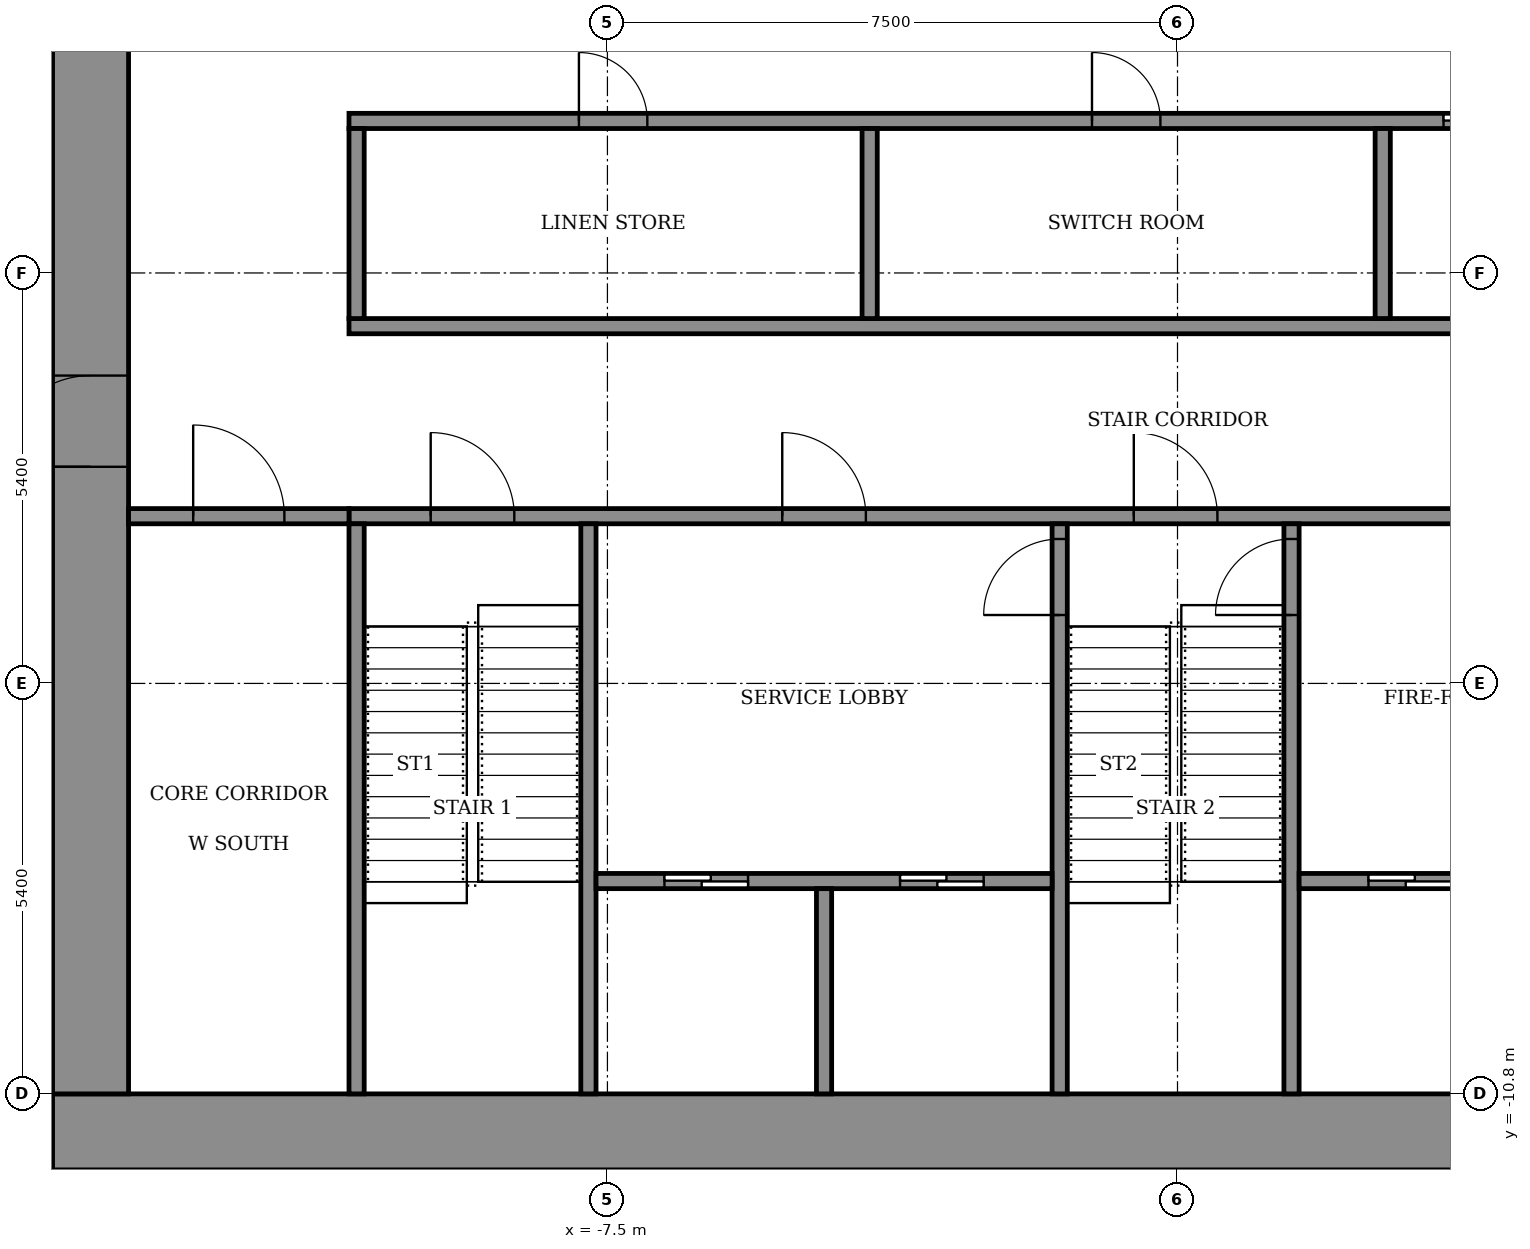
"""IFC4 building model, lengths in metres.
Left out: names, types, materials, properties, quantities, classifications, styles, units other than length and angle.
Written with IfcOpenShell. Run it as: python <this file> out.ifc"""

import sys

from ifc_helpers import new_model, si_unit, direction, frame, frame_2d, origin, place, context, subcontext, project, spatial, rectangle, extrude, element, fill, save


model = new_model("IFC4")
c1 = context("Model", 3, precision=1e-05, world=origin(), true_north=direction((0.0, 1.0)))
c2 = subcontext(c1, "Body", "Model", "MODEL_VIEW")
j1 = project(units=[si_unit("LENGTHUNIT", "METRE"), si_unit("PLANEANGLEUNIT", "RADIAN")], contexts=[c1])
p1 = place(None, origin())
s1 = spatial("IfcSite", under=j1, at=p1, CompositionType="ELEMENT")
p2 = place(p1, origin())
s2 = spatial("IfcBuilding", under=s1, at=p2, CompositionType="ELEMENT")
p3 = place(p2, frame((0.0, 0.0, 125.5)))
s3 = spatial("IfcBuildingStorey", under=s2, at=p3, CompositionType="ELEMENT", Elevation=125.5)
p4 = place(p3, frame((-14.8, -11.3, 0.0), z_axis=(0.0, 0.0, 1.0), x_axis=(1.0, 0.0, 0.0)))
e1 = element("IfcWall", 1, at=p4, inside=s3, PredefinedType="SHEAR", context=c2, shape_type="SweptSolid", body=[
    extrude(rectangle(XDim=29.6, YDim=1.0, at=frame_2d((14.8, 0.0))), origin(), (0.0, 0.0, 1.0), 4.6),
])
p5 = place(p3, frame((-14.3, -10.8, 0.0), z_axis=(0.0, 0.0, 1.0), x_axis=(0.0, 1.0, 0.0)))
e2 = element("IfcWall", 2, at=p5, inside=s3, PredefinedType="SHEAR", context=c2, shape_type="SweptSolid", body=[
    extrude(rectangle(XDim=21.6, YDim=1.0, at=frame_2d((10.8, 0.0))), origin(), (0.0, 0.0, 1.0), 4.6),
])
p6 = place(p5, frame((8.25, 0.0, 0.0)))
e3 = element("IfcOpeningElement", 3, at=p6, cuts=e2, PredefinedType="OPENING", context=c2, shape_type="SweptSolid", body=[
    extrude(rectangle(XDim=1.2, YDim=2.1, at=frame_2d((0.6, 1.05))), frame((0.0, 0.51, 0.0), z_axis=(0.0, -1.0, 0.0), x_axis=(1.0, 0.0, 0.0)), (0.0, 0.0, 1.0), 1.02),
])
p7 = place(p5, frame((15.25, 0.0, 0.0)))
e4 = element("IfcOpeningElement", 4, at=p7, cuts=e2, PredefinedType="OPENING", context=c2, shape_type="SweptSolid", body=[
    extrude(rectangle(XDim=1.2, YDim=2.1, at=frame_2d((0.6, 1.05))), frame((0.0, 0.51, 0.0), z_axis=(0.0, -1.0, 0.0), x_axis=(1.0, 0.0, 0.0)), (0.0, 0.0, 1.0), 1.02),
])
p8 = place(p3, frame((-10.9, -3.2, 0.0), z_axis=(0.0, 0.0, 1.0), x_axis=(1.0, 0.0, 0.0)))
e5 = element("IfcWall", 5, at=p8, inside=s3, PredefinedType="SHEAR", context=c2, shape_type="SweptSolid", body=[
    extrude(rectangle(XDim=21.8, YDim=0.2, at=frame_2d((10.9, 0.0))), origin(), (0.0, 0.0, 1.0), 4.05),
])
p9 = place(p8, frame((1.075, 0.0, 0.0)))
e6 = element("IfcOpeningElement", 6, at=p9, cuts=e5, PredefinedType="OPENING", context=c2, shape_type="SweptSolid", body=[
    extrude(rectangle(XDim=1.1, YDim=2.1, at=frame_2d((0.55, 1.05))), frame((0.0, 0.11, 0.0), z_axis=(0.0, -1.0, 0.0), x_axis=(1.0, 0.0, 0.0)), (0.0, 0.0, 1.0), 0.22),
])
p10 = place(p8, frame((10.325, 0.0, 0.0)))
e7 = element("IfcOpeningElement", 7, at=p10, cuts=e5, PredefinedType="OPENING", context=c2, shape_type="SweptSolid", body=[
    extrude(rectangle(XDim=1.1, YDim=2.1, at=frame_2d((0.55, 1.05))), frame((0.0, 0.11, 0.0), z_axis=(0.0, -1.0, 0.0), x_axis=(1.0, 0.0, 0.0)), (0.0, 0.0, 1.0), 0.22),
])
p11 = place(p8, frame((19.625, 0.0, 0.0)))
e8 = element("IfcOpeningElement", 8, at=p11, cuts=e5, PredefinedType="OPENING", context=c2, shape_type="SweptSolid", body=[
    extrude(rectangle(XDim=1.1, YDim=2.1, at=frame_2d((0.55, 1.05))), frame((0.0, 0.11, 0.0), z_axis=(0.0, -1.0, 0.0), x_axis=(1.0, 0.0, 0.0)), (0.0, 0.0, 1.0), 0.22),
])
p12 = place(p8, frame((5.7, 0.0, 0.0)))
e9 = element("IfcOpeningElement", 9, at=p12, cuts=e5, PredefinedType="OPENING", context=c2, shape_type="SweptSolid", body=[
    extrude(rectangle(XDim=1.1, YDim=2.1, at=frame_2d((0.55, 1.05))), frame((0.0, 0.11, 0.0), z_axis=(0.0, -1.0, 0.0), x_axis=(1.0, 0.0, 0.0)), (0.0, 0.0, 1.0), 0.22),
])
p13 = place(p8, frame((14.975, 0.0, 0.0)))
e10 = element("IfcOpeningElement", 10, at=p13, cuts=e5, PredefinedType="OPENING", context=c2, shape_type="SweptSolid", body=[
    extrude(rectangle(XDim=1.1, YDim=2.1, at=frame_2d((0.55, 1.05))), frame((0.0, 0.11, 0.0), z_axis=(0.0, -1.0, 0.0), x_axis=(1.0, 0.0, 0.0)), (0.0, 0.0, 1.0), 0.22),
])
p14 = place(p3, frame((-10.9, -0.7, 0.0), z_axis=(0.0, 0.0, 1.0), x_axis=(1.0, 0.0, 0.0)))
e11 = element("IfcWall", 11, at=p14, inside=s3, PredefinedType="SHEAR", context=c2, shape_type="SweptSolid", body=[
    extrude(rectangle(XDim=21.8, YDim=0.2, at=frame_2d((10.9, 0.0))), origin(), (0.0, 0.0, 1.0), 4.05),
])
p15 = place(p3, frame((-10.9, 2.0, 0.0), z_axis=(0.0, 0.0, 1.0), x_axis=(1.0, 0.0, 0.0)))
e12 = element("IfcWall", 12, at=p15, inside=s3, PredefinedType="SHEAR", context=c2, shape_type="SweptSolid", body=[
    extrude(rectangle(XDim=21.8, YDim=0.2, at=frame_2d((10.9, 0.0))), origin(), (0.0, 0.0, 1.0), 4.05),
])
p16 = place(p15, frame((14.4, 0.0, 0.0)))
e13 = element("IfcOpeningElement", 13, at=p16, cuts=e12, PredefinedType="OPENING", context=c2, shape_type="SweptSolid", body=[
    extrude(rectangle(XDim=1.1, YDim=2.1, at=frame_2d((0.55, 1.05))), frame((0.0, 0.11, 0.0), z_axis=(0.0, -1.0, 0.0), x_axis=(1.0, 0.0, 0.0)), (0.0, 0.0, 1.0), 0.22),
])
p17 = place(p15, frame((17.1, 0.0, 0.0)))
e14 = element("IfcOpeningElement", 14, at=p17, cuts=e12, PredefinedType="OPENING", context=c2, shape_type="SweptSolid", body=[
    extrude(rectangle(XDim=1.1, YDim=2.1, at=frame_2d((0.55, 1.05))), frame((0.0, 0.11, 0.0), z_axis=(0.0, -1.0, 0.0), x_axis=(1.0, 0.0, 0.0)), (0.0, 0.0, 1.0), 0.22),
])
p18 = place(p15, frame((19.8, 0.0, 0.0)))
e15 = element("IfcOpeningElement", 15, at=p18, cuts=e12, PredefinedType="OPENING", context=c2, shape_type="SweptSolid", body=[
    extrude(rectangle(XDim=1.1, YDim=2.1, at=frame_2d((0.55, 1.05))), frame((0.0, 0.11, 0.0), z_axis=(0.0, -1.0, 0.0), x_axis=(1.0, 0.0, 0.0)), (0.0, 0.0, 1.0), 0.22),
])
p19 = place(p15, frame((3.025, 0.0, 0.0)))
e16 = element("IfcOpeningElement", 16, at=p19, cuts=e12, PredefinedType="OPENING", context=c2, shape_type="SweptSolid", body=[
    extrude(rectangle(XDim=0.9, YDim=2.1, at=frame_2d((0.45, 1.05))), frame((0.0, 0.11, 0.0), z_axis=(0.0, -1.0, 0.0), x_axis=(1.0, 0.0, 0.0)), (0.0, 0.0, 1.0), 0.22),
])
p20 = place(p15, frame((9.775, 0.0, 0.0)))
e17 = element("IfcOpeningElement", 17, at=p20, cuts=e12, PredefinedType="OPENING", context=c2, shape_type="SweptSolid", body=[
    extrude(rectangle(XDim=0.9, YDim=2.1, at=frame_2d((0.45, 1.05))), frame((0.0, 0.11, 0.0), z_axis=(0.0, -1.0, 0.0), x_axis=(1.0, 0.0, 0.0)), (0.0, 0.0, 1.0), 0.22),
])
for number, where, z_axis, x_axis in (
    (18, (-10.8, -10.8, 0.0), (0.0, 0.0, 1.0), (0.0, 1.0, 0.0)),
    (19, (-7.75, -10.8, 0.0), (0.0, 0.0, 1.0), (0.0, 1.0, 0.0)),
):
    element("IfcWall", number, at=place(p3, frame(where, z_axis=z_axis, x_axis=x_axis)), inside=s3, PredefinedType="SHEAR", context=c2, shape_type="SweptSolid", body=[
        extrude(rectangle(XDim=7.5, YDim=0.2, at=frame_2d((3.75, 0.0))), origin(), (0.0, 0.0, 1.0), 4.05),
    ])
p21 = place(p3, frame((-1.55, -10.8, 0.0), z_axis=(0.0, 0.0, 1.0), x_axis=(0.0, 1.0, 0.0)))
e20 = element("IfcWall", 20, at=p21, inside=s3, PredefinedType="SHEAR", context=c2, shape_type="SweptSolid", body=[
    extrude(rectangle(XDim=7.5, YDim=0.2, at=frame_2d((3.75, 0.0))), origin(), (0.0, 0.0, 1.0), 4.05),
])
p22 = place(p21, frame((6.3, 0.0, 0.0)))
e21 = element("IfcOpeningElement", 21, at=p22, cuts=e20, PredefinedType="OPENING", context=c2, shape_type="SweptSolid", body=[
    extrude(rectangle(XDim=1.0, YDim=2.1, at=frame_2d((0.5, 1.05))), frame((0.0, 0.11, 0.0), z_axis=(0.0, -1.0, 0.0), x_axis=(1.0, 0.0, 0.0)), (0.0, 0.0, 1.0), 0.22),
])
p23 = place(p3, frame((1.5, -10.8, 0.0), z_axis=(0.0, 0.0, 1.0), x_axis=(0.0, 1.0, 0.0)))
e22 = element("IfcWall", 22, at=p23, inside=s3, PredefinedType="SHEAR", context=c2, shape_type="SweptSolid", body=[
    extrude(rectangle(XDim=7.5, YDim=0.2, at=frame_2d((3.75, 0.0))), origin(), (0.0, 0.0, 1.0), 4.05),
])
p24 = place(p23, frame((6.3, 0.0, 0.0)))
e23 = element("IfcOpeningElement", 23, at=p24, cuts=e22, PredefinedType="OPENING", context=c2, shape_type="SweptSolid", body=[
    extrude(rectangle(XDim=1.0, YDim=2.1, at=frame_2d((0.5, 1.05))), frame((0.0, 0.11, 0.0), z_axis=(0.0, -1.0, 0.0), x_axis=(1.0, 0.0, 0.0)), (0.0, 0.0, 1.0), 0.22),
])
p25 = place(p3, frame((-7.65, -8.0, 0.0), z_axis=(0.0, 0.0, 1.0), x_axis=(1.0, 0.0, 0.0)))
e24 = element("IfcWall", 24, at=p25, inside=s3, PredefinedType="SHEAR", context=c2, shape_type="SweptSolid", body=[
    extrude(rectangle(XDim=6.0, YDim=0.2, at=frame_2d((3.0, 0.0))), origin(), (0.0, 0.0, 1.0), 4.05),
])
p26 = place(p25, frame((0.9, 0.0, 0.0)))
e25 = element("IfcOpeningElement", 25, at=p26, cuts=e24, PredefinedType="OPENING", context=c2, shape_type="SweptSolid", body=[
    extrude(rectangle(XDim=1.1, YDim=2.1, at=frame_2d((0.55, 1.05))), frame((0.0, 0.11, 0.0), z_axis=(0.0, -1.0, 0.0), x_axis=(1.0, 0.0, 0.0)), (0.0, 0.0, 1.0), 0.22),
])
p27 = place(p25, frame((4.0, 0.0, 0.0)))
e26 = element("IfcOpeningElement", 26, at=p27, cuts=e24, PredefinedType="OPENING", context=c2, shape_type="SweptSolid", body=[
    extrude(rectangle(XDim=1.1, YDim=2.1, at=frame_2d((0.55, 1.05))), frame((0.0, 0.11, 0.0), z_axis=(0.0, -1.0, 0.0), x_axis=(1.0, 0.0, 0.0)), (0.0, 0.0, 1.0), 0.22),
])
p28 = place(p3, frame((-4.65, -10.8, 0.0), z_axis=(0.0, 0.0, 1.0), x_axis=(0.0, 1.0, 0.0)))
e27 = element("IfcWall", 27, at=p28, inside=s3, PredefinedType="SHEAR", context=c2, shape_type="SweptSolid", body=[
    extrude(rectangle(XDim=2.7, YDim=0.2, at=frame_2d((1.35, 0.0))), origin(), (0.0, 0.0, 1.0), 4.05),
])
p29 = place(p3, frame((1.6, -8.0, 0.0), z_axis=(0.0, 0.0, 1.0), x_axis=(1.0, 0.0, 0.0)))
e28 = element("IfcWall", 28, at=p29, inside=s3, PredefinedType="SHEAR", context=c2, shape_type="SweptSolid", body=[
    extrude(rectangle(XDim=6.05, YDim=0.2, at=frame_2d((3.025, 0.0))), origin(), (0.0, 0.0, 1.0), 4.05),
])
p30 = place(p29, frame((0.913, 0.0, 0.0)))
e29 = element("IfcOpeningElement", 29, at=p30, cuts=e28, PredefinedType="OPENING", context=c2, shape_type="SweptSolid", body=[
    extrude(rectangle(XDim=1.1, YDim=2.1, at=frame_2d((0.55, 1.05))), frame((0.0, 0.11, 0.0), z_axis=(0.0, -1.0, 0.0), x_axis=(1.0, 0.0, 0.0)), (0.0, 0.0, 1.0), 0.22),
])
p31 = place(p29, frame((4.038, 0.0, 0.0)))
e30 = element("IfcOpeningElement", 30, at=p31, cuts=e28, PredefinedType="OPENING", context=c2, shape_type="SweptSolid", body=[
    extrude(rectangle(XDim=1.1, YDim=2.1, at=frame_2d((0.55, 1.05))), frame((0.0, 0.11, 0.0), z_axis=(0.0, -1.0, 0.0), x_axis=(1.0, 0.0, 0.0)), (0.0, 0.0, 1.0), 0.22),
])
for number, where, z_axis, x_axis in (
    (31, (-10.8, -0.6, 0.0), (0.0, 0.0, 1.0), (0.0, 1.0, 0.0)),
    (32, (-4.05, -0.6, 0.0), (0.0, 0.0, 1.0), (0.0, 1.0, 0.0)),
):
    element("IfcWall", number, at=place(p3, frame(where, z_axis=z_axis, x_axis=x_axis)), inside=s3, PredefinedType="STANDARD", context=c2, shape_type="SweptSolid", body=[
        extrude(rectangle(XDim=2.5, YDim=0.2, at=frame_2d((1.25, 0.0))), origin(), (0.0, 0.0, 1.0), 4.05),
    ])
p32 = place(p3, frame((2.7, -0.6, 0.0), z_axis=(0.0, 0.0, 1.0), x_axis=(0.0, 1.0, 0.0)))
e33 = element("IfcWall", 33, at=p32, inside=s3, PredefinedType="SHEAR", context=c2, shape_type="SweptSolid", body=[
    extrude(rectangle(XDim=2.5, YDim=0.2, at=frame_2d((1.25, 0.0))), origin(), (0.0, 0.0, 1.0), 4.05),
])
p33 = place(p3, frame((-13.8, -3.2, 0.0), z_axis=(0.0, 0.0, 1.0), x_axis=(1.0, 0.0, 0.0)))
e34 = element("IfcWall", 34, at=p33, inside=s3, PredefinedType="STANDARD", context=c2, shape_type="SweptSolid", body=[
    extrude(rectangle(XDim=2.9, YDim=0.2, at=frame_2d((1.45, 0.0))), origin(), (0.0, 0.0, 1.0), 4.05),
])
p34 = place(p33, frame((0.85, 0.0, 0.0)))
e35 = element("IfcOpeningElement", 35, at=p34, cuts=e34, PredefinedType="OPENING", context=c2, shape_type="SweptSolid", body=[
    extrude(rectangle(XDim=1.2, YDim=2.1, at=frame_2d((0.6, 1.05))), frame((0.0, 0.11, 0.0), z_axis=(0.0, -1.0, 0.0), x_axis=(1.0, 0.0, 0.0)), (0.0, 0.0, 1.0), 0.22),
])
p35 = place(p6, origin())
e36 = element("IfcDoor", 36, at=p35, inside=s3, OperationType="DOUBLE_DOOR_SINGLE_SWING", PredefinedType="DOOR", context=c2, shape_type="SweptSolid", body=[
    extrude(rectangle(XDim=1.2, YDim=2.1, at=frame_2d((0.6, 1.05))), frame((0.0, 0.025, 0.0), z_axis=(0.0, -1.0, 0.0), x_axis=(1.0, 0.0, 0.0)), (0.0, 0.0, 1.0), 0.05),
])
fill(e3, e36)
p36 = place(p16, origin())
e37 = element("IfcDoor", 37, at=p36, inside=s3, OperationType="SLIDING_TO_LEFT", PredefinedType="DOOR", context=c2, shape_type="SweptSolid", body=[
    extrude(rectangle(XDim=1.1, YDim=2.1, at=frame_2d((0.55, 1.05))), frame((0.0, 0.025, 0.0), z_axis=(0.0, -1.0, 0.0), x_axis=(1.0, 0.0, 0.0)), (0.0, 0.0, 1.0), 0.05),
])
fill(e13, e37)
p37 = place(p19, origin())
e38 = element("IfcDoor", 38, at=p37, inside=s3, OperationType="SINGLE_SWING_RIGHT", PredefinedType="DOOR", context=c2, shape_type="SweptSolid", body=[
    extrude(rectangle(XDim=0.9, YDim=2.1, at=frame_2d((0.45, 1.05))), frame((0.0, 0.025, 0.0), z_axis=(0.0, -1.0, 0.0), x_axis=(1.0, 0.0, 0.0)), (0.0, 0.0, 1.0), 0.05),
])
fill(e16, e38)
p38 = place(p20, origin())
e39 = element("IfcDoor", 39, at=p38, inside=s3, OperationType="SINGLE_SWING_LEFT", PredefinedType="DOOR", context=c2, shape_type="SweptSolid", body=[
    extrude(rectangle(XDim=0.9, YDim=2.1, at=frame_2d((0.45, 1.05))), frame((0.0, 0.025, 0.0), z_axis=(0.0, -1.0, 0.0), x_axis=(1.0, 0.0, 0.0)), (0.0, 0.0, 1.0), 0.05),
])
fill(e17, e39)
p39 = place(p30, origin())
e40 = element("IfcDoor", 40, at=p39, inside=s3, OperationType="SLIDING_TO_LEFT", PredefinedType="DOOR", context=c2, shape_type="SweptSolid", body=[
    extrude(rectangle(XDim=1.1, YDim=2.1, at=frame_2d((0.55, 1.05))), frame((0.0, 0.025, 0.0), z_axis=(0.0, -1.0, 0.0), x_axis=(1.0, 0.0, 0.0)), (0.0, 0.0, 1.0), 0.05),
])
fill(e29, e40)
p40 = place(p26, origin())
e41 = element("IfcDoor", 41, at=p40, inside=s3, OperationType="SLIDING_TO_LEFT", PredefinedType="DOOR", context=c2, shape_type="SweptSolid", body=[
    extrude(rectangle(XDim=1.1, YDim=2.1, at=frame_2d((0.55, 1.05))), frame((0.0, 0.025, 0.0), z_axis=(0.0, -1.0, 0.0), x_axis=(1.0, 0.0, 0.0)), (0.0, 0.0, 1.0), 0.05),
])
fill(e25, e41)
p41 = place(p27, origin())
e42 = element("IfcDoor", 42, at=p41, inside=s3, OperationType="SLIDING_TO_LEFT", PredefinedType="DOOR", context=c2, shape_type="SweptSolid", body=[
    extrude(rectangle(XDim=1.1, YDim=2.1, at=frame_2d((0.55, 1.05))), frame((0.0, 0.025, 0.0), z_axis=(0.0, -1.0, 0.0), x_axis=(1.0, 0.0, 0.0)), (0.0, 0.0, 1.0), 0.05),
])
fill(e26, e42)
p42 = place(p9, origin())
e43 = element("IfcDoor", 43, at=p42, inside=s3, OperationType="SINGLE_SWING_RIGHT", PredefinedType="DOOR", context=c2, shape_type="SweptSolid", body=[
    extrude(rectangle(XDim=1.1, YDim=2.1, at=frame_2d((0.55, 1.05))), frame((0.0, 0.025, 0.0), z_axis=(0.0, -1.0, 0.0), x_axis=(1.0, 0.0, 0.0)), (0.0, 0.0, 1.0), 0.05),
])
fill(e6, e43)
p43 = place(p10, origin())
e44 = element("IfcDoor", 44, at=p43, inside=s3, OperationType="SINGLE_SWING_RIGHT", PredefinedType="DOOR", context=c2, shape_type="SweptSolid", body=[
    extrude(rectangle(XDim=1.1, YDim=2.1, at=frame_2d((0.55, 1.05))), frame((0.0, 0.025, 0.0), z_axis=(0.0, -1.0, 0.0), x_axis=(1.0, 0.0, 0.0)), (0.0, 0.0, 1.0), 0.05),
])
fill(e7, e44)
p44 = place(p12, origin())
e45 = element("IfcDoor", 45, at=p44, inside=s3, OperationType="SINGLE_SWING_LEFT", PredefinedType="DOOR", context=c2, shape_type="SweptSolid", body=[
    extrude(rectangle(XDim=1.1, YDim=2.1, at=frame_2d((0.55, 1.05))), frame((0.0, 0.025, 0.0), z_axis=(0.0, -1.0, 0.0), x_axis=(1.0, 0.0, 0.0)), (0.0, 0.0, 1.0), 0.05),
])
fill(e9, e45)
p45 = place(p22, origin())
e46 = element("IfcDoor", 46, at=p45, inside=s3, OperationType="SINGLE_SWING_RIGHT", PredefinedType="DOOR", context=c2, shape_type="SweptSolid", body=[
    extrude(rectangle(XDim=1.0, YDim=2.1, at=frame_2d((0.5, 1.05))), frame((0.0, 0.025, 0.0), z_axis=(0.0, -1.0, 0.0), x_axis=(1.0, 0.0, 0.0)), (0.0, 0.0, 1.0), 0.05),
])
fill(e21, e46)
p46 = place(p24, origin())
e47 = element("IfcDoor", 47, at=p46, inside=s3, OperationType="SINGLE_SWING_RIGHT", PredefinedType="DOOR", context=c2, shape_type="SweptSolid", body=[
    extrude(rectangle(XDim=1.0, YDim=2.1, at=frame_2d((0.5, 1.05))), frame((0.0, 0.025, 0.0), z_axis=(0.0, -1.0, 0.0), x_axis=(1.0, 0.0, 0.0)), (0.0, 0.0, 1.0), 0.05),
])
fill(e23, e47)
p47 = place(p34, origin())
e48 = element("IfcDoor", 48, at=p47, inside=s3, OperationType="SINGLE_SWING_LEFT", PredefinedType="DOOR", context=c2, shape_type="SweptSolid", body=[
    extrude(rectangle(XDim=1.2, YDim=2.1, at=frame_2d((0.6, 1.05))), frame((0.0, 0.025, 0.0), z_axis=(0.0, -1.0, 0.0), x_axis=(1.0, 0.0, 0.0)), (0.0, 0.0, 1.0), 0.05),
])
fill(e35, e48)
save(model, sys.argv[1])
